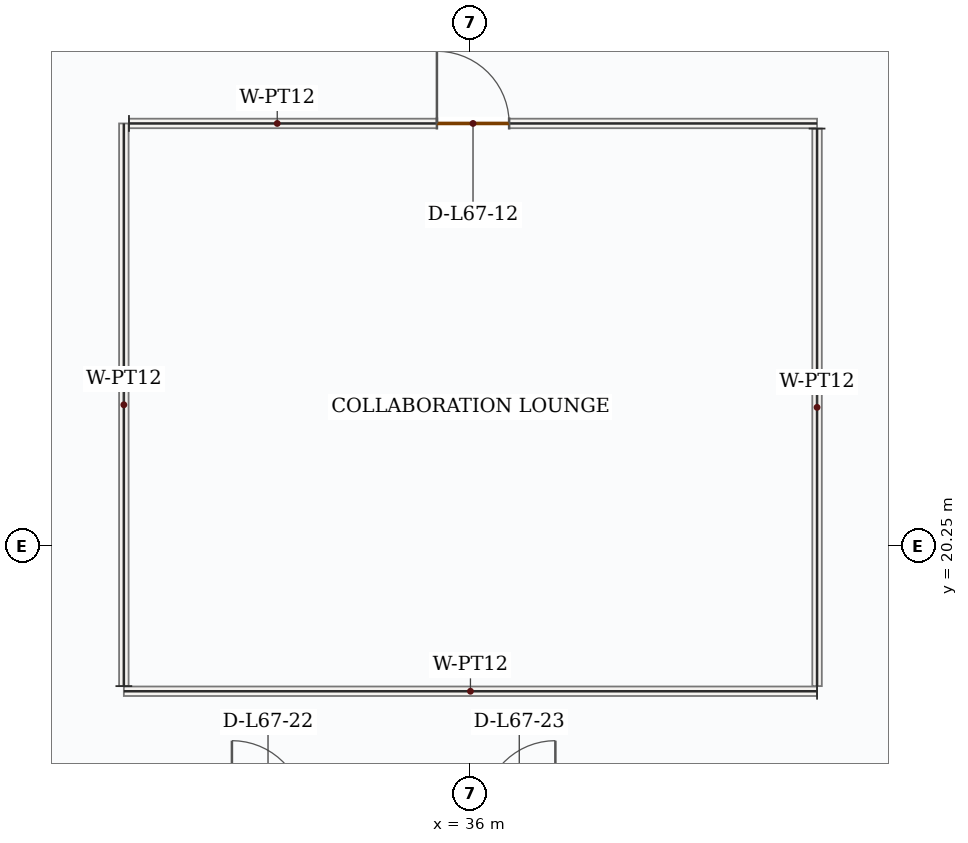
"""IFC4 building model, lengths in metres.
Left out: names, types, materials, properties, quantities, classifications, styles, units other than length and angle.
Written with IfcOpenShell. Run it as: python <this file> out.ifc"""

import sys

from ifc_helpers import new_model, si_unit, direction, frame, frame_2d, origin, place, context, subcontext, project, spatial, rectangle, extrude, source, transform, mapped, element, fill, save


model = new_model("IFC4")
c1 = context("Model", 3, precision=1e-05, world=origin(), true_north=direction((0.0, 1.0)))
c2 = subcontext(c1, "Body", "Model", "MODEL_VIEW")
j1 = project(units=[si_unit("LENGTHUNIT", "METRE"), si_unit("PLANEANGLEUNIT", "RADIAN")], contexts=[c1])
p1 = place(None, origin())
s1 = spatial("IfcSite", under=j1, at=p1, CompositionType="ELEMENT")
p2 = place(p1, origin())
s2 = spatial("IfcBuilding", under=s1, at=p2, CompositionType="ELEMENT")
p3 = place(p2, frame((0.0, 0.0, 280.35)))
s3 = spatial("IfcBuildingStorey", under=s2, at=p3, CompositionType="ELEMENT", Elevation=280.35)
m1 = source(origin(), c2, "Body", "SweptSolid", [
    extrude(rectangle(XDim=9.12, YDim=0.125, at=frame_2d((4.56, 0.0))), origin(), (0.0, 0.0, 1.0), 3.5),
])
p4 = place(p3, frame((40.56, 18.34, 0.0), z_axis=(0.0, 0.0, 1.0), x_axis=(-1.0, 0.0, 0.0)))
e1 = element("IfcWall", 1, at=p4, inside=s3, PredefinedType="PARTITIONING", context=c2, shape_type="MappedRepresentation", body=[
    mapped(m1, transform((0.0, 0.0, 0.0), x_axis=(1.0, 0.0, 0.0), y_axis=(0.0, 1.0, 0.0), z_axis=(0.0, 0.0, 1.0), scale=1.0)),
])
m2 = source(origin(), c2, "Body", "SweptSolid", [
    extrude(rectangle(XDim=7.403, YDim=0.125, at=frame_2d((3.701, 0.0))), origin(), (0.0, 0.0, 1.0), 3.5),
])
p5 = place(p3, frame((31.44, 18.407, 0.0), z_axis=(0.0, 0.0, 1.0), x_axis=(0.0, 1.0, 0.0)))
e2 = element("IfcWall", 2, at=p5, inside=s3, PredefinedType="PARTITIONING", context=c2, shape_type="MappedRepresentation", body=[
    mapped(m2, transform((0.0, 0.0, 0.0), x_axis=(1.0, 0.0, 0.0), y_axis=(0.0, 1.0, 0.0), z_axis=(0.0, 0.0, 1.0), scale=1.0)),
])
p6 = place(p3, frame((31.508, 25.81, 0.0), z_axis=(0.0, 0.0, 1.0), x_axis=(1.0, 0.0, 0.0)))
e3 = element("IfcWall", 3, at=p6, inside=s3, PredefinedType="PARTITIONING", context=c2, shape_type="SweptSolid", body=[
    extrude(rectangle(XDim=9.052, YDim=0.125, at=frame_2d((4.526, 0.0))), origin(), (0.0, 0.0, 1.0), 3.5),
])
p7 = place(p6, frame((4.051, 0.0, 0.0)))
e4 = element("IfcOpeningElement", 4, at=p7, cuts=e3, PredefinedType="OPENING", context=c2, shape_type="SweptSolid", body=[
    extrude(rectangle(XDim=0.95, YDim=2.15, at=frame_2d((0.475, 1.075))), frame((0.0, 0.073, 0.0), z_axis=(0.0, -1.0, 0.0), x_axis=(1.0, 0.0, 0.0)), (0.0, 0.0, 1.0), 0.145),
])
m3 = source(origin(), c2, "Body", "SweptSolid", [
    extrude(rectangle(XDim=7.335, YDim=0.125, at=frame_2d((3.667, 0.0))), origin(), (0.0, 0.0, 1.0), 3.5),
])
p8 = place(p3, frame((40.56, 25.742, 0.0), z_axis=(0.0, 0.0, 1.0), x_axis=(0.0, -1.0, 0.0)))
e5 = element("IfcWall", 5, at=p8, inside=s3, PredefinedType="PARTITIONING", context=c2, shape_type="MappedRepresentation", body=[
    mapped(m3, transform((0.0, 0.0, 0.0), x_axis=(1.0, 0.0, 0.0), y_axis=(0.0, 1.0, 0.0), z_axis=(0.0, 0.0, 1.0), scale=1.0)),
])
m4 = source(origin(), c2, "Body", "SweptSolid", [
    extrude(rectangle(XDim=0.95, YDim=2.15, at=frame_2d((0.475, 1.075))), frame((0.0, 0.025, 0.0), z_axis=(0.0, -1.0, 0.0), x_axis=(1.0, 0.0, 0.0)), (0.0, 0.0, 1.0), 0.05),
])
p9 = place(p7, origin())
e6 = element("IfcDoor", 6, at=p9, inside=s3, OperationType="SINGLE_SWING_LEFT", PredefinedType="DOOR", context=c2, shape_type="MappedRepresentation", body=[
    mapped(m4, transform((0.0, 0.0, 0.0), x_axis=(1.0, 0.0, 0.0), y_axis=(0.0, 1.0, 0.0), z_axis=(0.0, 0.0, 1.0), scale=1.0)),
])
fill(e4, e6)
save(model, sys.argv[1])
